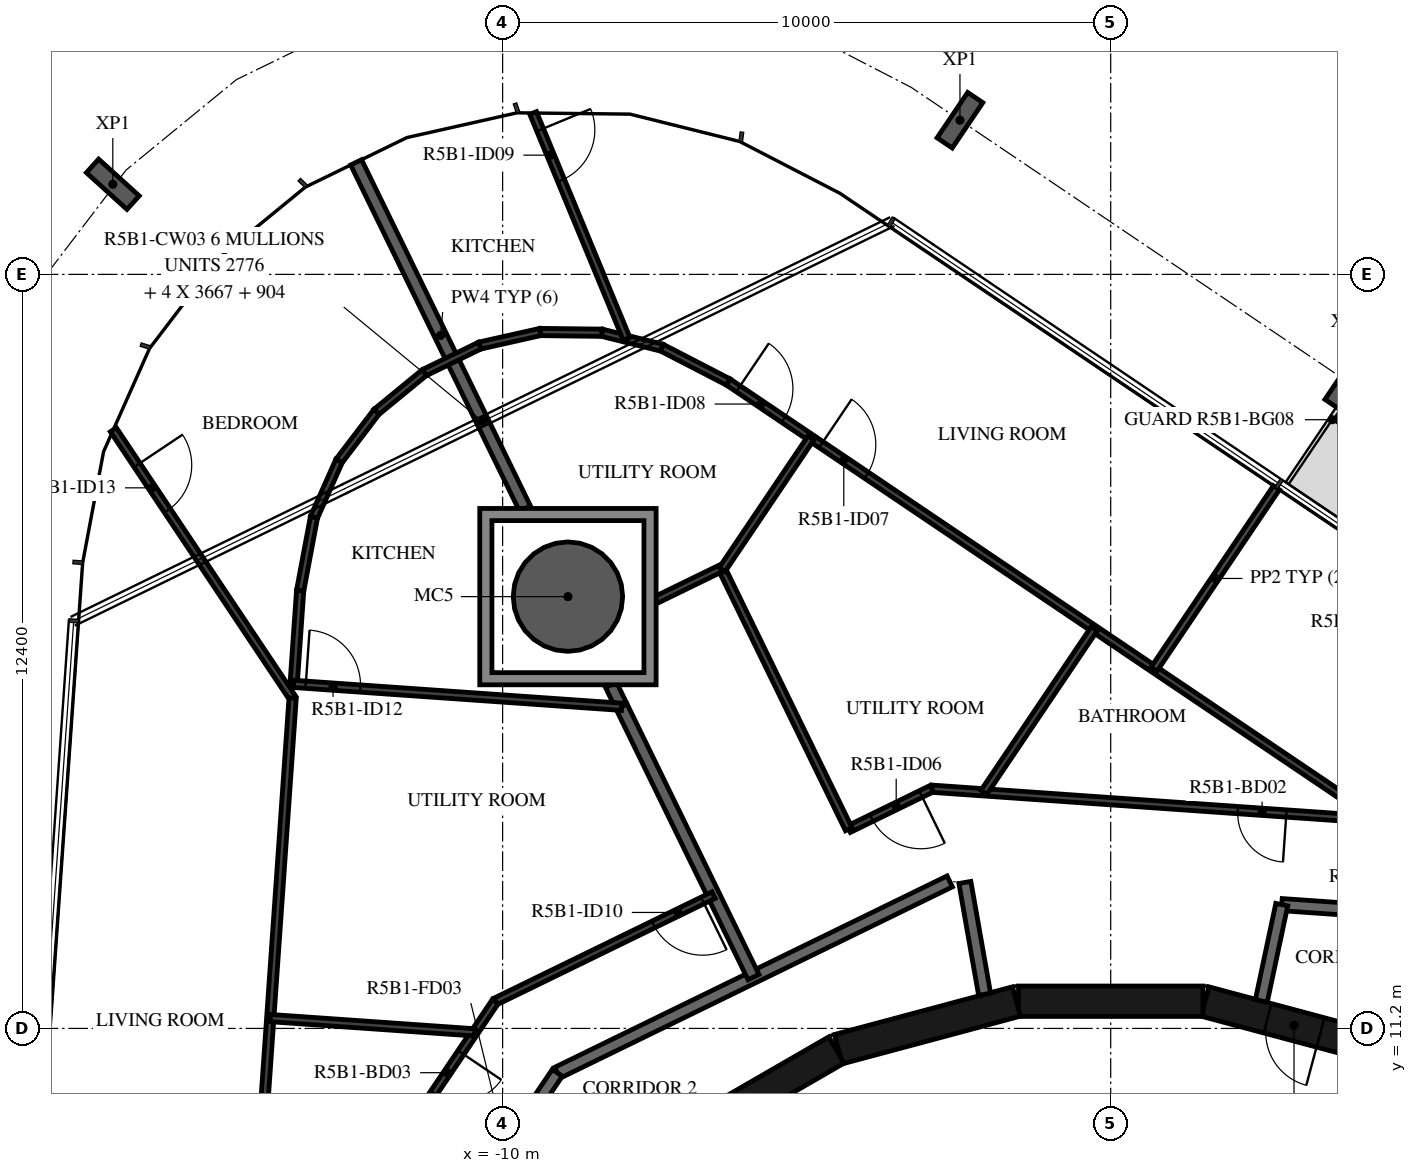
"""IFC4 building model, lengths in metres.
Left out: names, types, materials, properties, quantities, classifications, styles, units other than length and angle.
Written with IfcOpenShell. Run it as: python <this file> out.ifc"""

import sys

from ifc_helpers import new_model, si_unit, direction, frame, frame_2d, origin, origin_2d, place, context, subcontext, project, spatial, polyline, rectangle, hollow_circle, i_section, outline, extrude, element, fill, save


model = new_model("IFC4")
c1 = context("Model", 3, precision=1e-05, world=origin(), true_north=direction((0.0, 1.0)))
c2 = subcontext(c1, "Body", "Model", "MODEL_VIEW")
j1 = project(units=[si_unit("LENGTHUNIT", "METRE"), si_unit("PLANEANGLEUNIT", "RADIAN")], contexts=[c1])
p1 = place(None, origin())
s1 = spatial("IfcSite", under=j1, at=p1, CompositionType="ELEMENT")
p2 = place(p1, origin())
s2 = spatial("IfcBuilding", under=s1, at=p2, CompositionType="ELEMENT")
p3 = place(p2, frame((0.0, 0.0, 198.9)))
s3 = spatial("IfcBuildingStorey", under=s2, at=p3, CompositionType="ELEMENT", Elevation=198.9)
p4 = place(p3, frame((-8.926, 18.301, -0.38), z_axis=(0.0, 0.0, 1.0), x_axis=(1.0, 0.0, 0.0)))
e1 = element("IfcColumn", 1, at=p4, inside=s3, PredefinedType="COLUMN", context=c2, shape_type="SweptSolid", body=[
    extrude(hollow_circle(Radius=0.9, WallThickness=0.04, at=origin_2d()), origin(), (0.0, 0.0, 1.0), 3.5),
])
for number, where, z_axis, x_axis in (
    (2, (3.899, 21.833, -0.38), (0.0, 0.0, 1.0), (0.829, -0.559, 0.0)),
    (3, (-2.479, 26.135, -0.38), (0.0, 0.0, 1.0), (0.829, -0.559, 0.0)),
    (4, (-16.411, 25.082, -0.38), (0.0, 0.0, 1.0), (0.671, 0.741, 0.0)),
):
    element("IfcColumn", number, at=place(p3, frame(where, z_axis=z_axis, x_axis=x_axis)), inside=s3, PredefinedType="COLUMN", context=c2, shape_type="SweptSolid", body=[
        extrude(i_section(OverallWidth=0.3, OverallDepth=0.9, WebThickness=0.019, FlangeThickness=0.035, FilletRadius=0.03, at=origin_2d()), origin(), (0.0, 0.0, 1.0), 3.5),
    ])
p5 = place(p3, frame((4.479, 10.858, 0.0), z_axis=(0.0, 0.0, 1.0), x_axis=(-0.965948410781, 0.258734743916, 0.0)))
e5 = element("IfcWall", 5, at=p5, inside=s3, PredefinedType="SHEAR", context=c2, shape_type="SweptSolid", body=[
    extrude(rectangle(XDim=3.033, YDim=0.5, at=frame_2d((1.516, 0.0))), origin(), (0.0, 0.0, 1.0), 3.12),
])
p6 = place(p5, frame((1.066, 0.0, 0.0)))
e6 = element("IfcOpeningElement", 6, at=p6, cuts=e5, PredefinedType="OPENING", context=c2, shape_type="SweptSolid", body=[
    extrude(rectangle(XDim=0.9, YDim=2.1, at=frame_2d((0.45, 1.05))), frame((0.0, 0.26, 0.0), z_axis=(0.0, -1.0, 0.0), x_axis=(1.0, 0.0, 0.0)), (0.0, 0.0, 1.0), 0.52),
])
for number, where, z_axis, x_axis in (
    (7, (1.516, 11.647, 0.0), (0.0, 0.0, 1.0), (-1.0, 0.0, 0.0)),
    (8, (-1.55, 11.643, 0.0), (0.0, 0.0, 1.0), (-0.966, -0.259, 0.0)),
    (9, (-4.51, 10.845, 0.0), (0.0, 0.0, 1.0), (-0.866, -0.5, 0.0)),
):
    element("IfcWall", number, at=place(p3, frame(where, z_axis=z_axis, x_axis=x_axis)), inside=s3, PredefinedType="SHEAR", context=c2, shape_type="SweptSolid", body=[
        extrude(rectangle(XDim=3.033, YDim=0.5, at=frame_2d((1.516, 0.0))), origin(), (0.0, 0.0, 1.0), 3.12),
    ])
p7 = place(p3, frame((4.517, 13.117, 0.0), z_axis=(0.0, 0.0, 1.0), x_axis=(-0.997562153664, 0.069783591025, 0.0)))
e10 = element("IfcWall", 10, at=p7, inside=s3, PredefinedType="STANDARD", context=c2, shape_type="SweptSolid", body=[
    extrude(rectangle(XDim=1.707, YDim=0.2, at=frame_2d((0.854, 0.0))), origin(), (0.0, 0.0, 1.0), 3.12),
])
p8 = place(p3, frame((2.813, 13.236, 0.0), z_axis=(0.0, 0.0, 1.0), x_axis=(-0.207911086063, -0.978147729278, 0.0)))
e11 = element("IfcWall", 11, at=p8, inside=s3, PredefinedType="STANDARD", context=c2, shape_type="SweptSolid", body=[
    extrude(rectangle(XDim=1.618, YDim=0.2, at=frame_2d((0.809, 0.0))), origin(), (0.0, 0.0, 1.0), 3.12),
])
p9 = place(p3, frame((-2.074, 11.761, 0.0), z_axis=(0.0, 0.0, 1.0), x_axis=(-0.173740587112, 0.984791454263, 0.0)))
e12 = element("IfcWall", 12, at=p9, inside=s3, PredefinedType="STANDARD", context=c2, shape_type="SweptSolid", body=[
    extrude(rectangle(XDim=1.867, YDim=0.2, at=frame_2d((0.934, 0.0))), origin(), (0.0, 0.0, 1.0), 3.12),
])
p10 = place(p3, frame((-2.647, 13.618, 0.0), z_axis=(0.0, 0.0, 1.0), x_axis=(-0.898796543751, -0.438366026218, 0.0)))
e13 = element("IfcWall", 13, at=p10, inside=s3, PredefinedType="STANDARD", context=c2, shape_type="SweptSolid", body=[
    extrude(rectangle(XDim=7.181, YDim=0.2, at=frame_2d((3.591, 0.0))), origin(), (0.0, 0.0, 1.0), 3.12),
])
p11 = place(p3, frame((-9.101, 10.47, 0.0), z_axis=(0.0, 0.0, 1.0), x_axis=(-0.559195469534, -0.829035841718, 0.0)))
e14 = element("IfcWall", 14, at=p11, inside=s3, PredefinedType="STANDARD", context=c2, shape_type="SweptSolid", body=[
    extrude(rectangle(XDim=7.181, YDim=0.2, at=frame_2d((3.591, 0.0))), origin(), (0.0, 0.0, 1.0), 3.12),
])
p12 = place(p11, frame((1.0, 0.0, 0.0)))
e15 = element("IfcOpeningElement", 15, at=p12, cuts=e14, PredefinedType="OPENING", context=c2, shape_type="SweptSolid", body=[
    extrude(rectangle(XDim=1.0, YDim=2.1, at=frame_2d((0.5, 1.05))), frame((0.0, 0.11, 0.0), z_axis=(0.0, -1.0, 0.0), x_axis=(1.0, 0.0, 0.0)), (0.0, 0.0, 1.0), 0.22),
])
p13 = place(p3, frame((-8.042, 16.489, 0.0), z_axis=(0.0, 0.0, 1.0), x_axis=(0.438345825707, -0.898806395774, 0.0)))
e16 = element("IfcWall", 16, at=p13, inside=s3, PredefinedType="STANDARD", context=c2, shape_type="SweptSolid", body=[
    extrude(rectangle(XDim=4.946, YDim=0.2, at=frame_2d((2.473, 0.0))), origin(), (0.0, 0.0, 1.0), 3.12),
])
p14 = place(p3, frame((-8.219, 16.851, 0.0), z_axis=(0.0, 0.0, 1.0), x_axis=(0.438281645094, -0.898837693676, 0.0)))
e17 = element("IfcWall", 17, at=p14, inside=s3, PredefinedType="STANDARD", context=c2, shape_type="SweptSolid", body=[
    extrude(rectangle(XDim=0.373, YDim=0.2, at=frame_2d((0.186, 0.0))), origin(), (0.0, 0.0, 1.0), 3.12),
])
p15 = place(p3, frame((-12.409, 25.442, 0.0), z_axis=(0.0, 0.0, 1.0), x_axis=(0.43838641251, -0.898786600549, 0.0)))
e18 = element("IfcWall", 18, at=p15, inside=s3, PredefinedType="STANDARD", context=c2, shape_type="SweptSolid", body=[
    extrude(rectangle(XDim=6.333, YDim=0.2, at=frame_2d((3.166, 0.0))), origin(), (0.0, 0.0, 1.0), 3.12),
])
p16 = place(p3, frame((5.022, 14.585, 0.0), z_axis=(0.0, 0.0, 1.0), x_axis=(-0.997565118395, 0.069741197017, 0.0)))
e19 = element("IfcWall", 19, at=p16, inside=s3, PredefinedType="PARTITIONING", context=c2, shape_type="SweptSolid", body=[
    extrude(rectangle(XDim=7.985, YDim=0.12, at=frame_2d((3.993, 0.0))), origin(), (0.0, 0.0, 1.0), 3.12),
])
p17 = place(p16, frame((2.138, 0.0, 0.0)))
e20 = element("IfcOpeningElement", 20, at=p17, cuts=e19, PredefinedType="OPENING", context=c2, shape_type="SweptSolid", body=[
    extrude(rectangle(XDim=0.8, YDim=2.1, at=frame_2d((0.4, 1.05))), frame((0.0, 0.07, 0.0), z_axis=(0.0, -1.0, 0.0), x_axis=(1.0, 0.0, 0.0)), (0.0, 0.0, 1.0), 0.14),
])
p18 = place(p3, frame((-2.943, 15.142, 0.0), z_axis=(0.0, 0.0, 1.0), x_axis=(-0.898853439798, -0.438249351127, 0.0)))
e21 = element("IfcWall", 21, at=p18, inside=s3, PredefinedType="PARTITIONING", context=c2, shape_type="SweptSolid", body=[
    extrude(rectangle(XDim=1.518, YDim=0.12, at=frame_2d((0.759, 0.0))), origin(), (0.0, 0.0, 1.0), 3.12),
])
p19 = place(p18, frame((0.2, 0.0, 0.0)))
e22 = element("IfcOpeningElement", 22, at=p19, cuts=e21, PredefinedType="OPENING", context=c2, shape_type="SweptSolid", body=[
    extrude(rectangle(XDim=0.9, YDim=2.1, at=frame_2d((0.45, 1.05))), frame((0.0, 0.07, 0.0), z_axis=(0.0, -1.0, 0.0), x_axis=(1.0, 0.0, 0.0)), (0.0, 0.0, 1.0), 0.14),
])
p20 = place(p3, frame((-4.308, 14.477, 0.0), z_axis=(0.0, 0.0, 1.0), x_axis=(-0.43837096777, 0.898794133613, 0.0)))
e23 = element("IfcWall", 23, at=p20, inside=s3, PredefinedType="PARTITIONING", context=c2, shape_type="SweptSolid", body=[
    extrude(rectangle(XDim=4.75, YDim=0.12, at=frame_2d((2.375, 0.0))), origin(), (0.0, 0.0, 1.0), 3.12),
])
p21 = place(p3, frame((-6.402, 18.771, 0.0), z_axis=(0.0, 0.0, 1.0), x_axis=(-0.898797905192, -0.438363234797, 0.0)))
e24 = element("IfcWall", 24, at=p21, inside=s3, PredefinedType="PARTITIONING", context=c2, shape_type="SweptSolid", body=[
    extrude(rectangle(XDim=1.195, YDim=0.12, at=frame_2d((0.597, 0.0))), origin(), (0.0, 0.0, 1.0), 3.12),
])
p22 = place(p3, frame((-6.292, 21.831, 0.0), z_axis=(0.0, 0.0, 1.0), x_axis=(0.829040041754, -0.559189242715, 0.0)))
e25 = element("IfcWall", 25, at=p22, inside=s3, PredefinedType="PARTITIONING", context=c2, shape_type="SweptSolid", body=[
    extrude(rectangle(XDim=12.879, YDim=0.12, at=frame_2d((6.439, 0.0))), origin(), (0.0, 0.0, 1.0), 3.12),
])
p23 = place(p22, frame((1.844, 0.0, 0.0)))
e26 = element("IfcOpeningElement", 26, at=p23, cuts=e25, PredefinedType="OPENING", context=c2, shape_type="SweptSolid", body=[
    extrude(rectangle(XDim=0.9, YDim=2.1, at=frame_2d((0.45, 1.05))), frame((0.0, 0.07, 0.0), z_axis=(0.0, -1.0, 0.0), x_axis=(1.0, 0.0, 0.0)), (0.0, 0.0, 1.0), 0.14),
])
p24 = place(p22, frame((0.2, 0.0, 0.0)))
e27 = element("IfcOpeningElement", 27, at=p24, cuts=e25, PredefinedType="OPENING", context=c2, shape_type="SweptSolid", body=[
    extrude(rectangle(XDim=0.9, YDim=2.1, at=frame_2d((0.45, 1.05))), frame((0.0, 0.07, 0.0), z_axis=(0.0, -1.0, 0.0), x_axis=(1.0, 0.0, 0.0)), (0.0, 0.0, 1.0), 0.14),
])
p25 = place(p3, frame((2.725, 20.092, 0.0), z_axis=(0.0, 0.0, 1.0), x_axis=(-0.559230560117, -0.829012171582, 0.0)))
e28 = element("IfcWall", 28, at=p25, inside=s3, PredefinedType="PARTITIONING", context=c2, shape_type="SweptSolid", body=[
    extrude(rectangle(XDim=3.6, YDim=0.12, at=frame_2d((1.8, 0.0))), origin(), (0.0, 0.0, 1.0), 2.73),
])
p26 = place(p3, frame((-0.272, 17.771, 0.0), z_axis=(0.0, 0.0, 1.0), x_axis=(-0.559174158254, -0.829050216055, 0.0)))
e29 = element("IfcWall", 29, at=p26, inside=s3, PredefinedType="PARTITIONING", context=c2, shape_type="SweptSolid", body=[
    extrude(rectangle(XDim=3.243, YDim=0.12, at=frame_2d((1.622, 0.0))), origin(), (0.0, 0.0, 1.0), 3.12),
])
p27 = place(p3, frame((-8.367, 22.64, 0.0), z_axis=(0.0, 0.0, 1.0), x_axis=(0.970340073087, -0.241743960754, 0.0)))
e30 = element("IfcWall", 30, at=p27, inside=s3, PredefinedType="PARTITIONING", context=c2, shape_type="SweptSolid", body=[
    extrude(rectangle(XDim=1.016, YDim=0.12, at=frame_2d((0.508, 0.0))), origin(), (0.0, 0.0, 1.0), 3.12),
])
p28 = place(p3, frame((-7.382, 22.395, 0.0), z_axis=(0.0, 0.0, 1.0), x_axis=(0.888296031948, -0.459271335514, 0.0)))
e31 = element("IfcWall", 31, at=p28, inside=s3, PredefinedType="PARTITIONING", context=c2, shape_type="SweptSolid", body=[
    extrude(rectangle(XDim=1.227, YDim=0.12, at=frame_2d((0.613, 0.0))), origin(), (0.0, 0.0, 1.0), 3.12),
])
p29 = place(p3, frame((-9.498, 26.254, 0.0), z_axis=(0.0, 0.0, 1.0), x_axis=(0.38230709116, -0.924035328355, 0.0)))
e32 = element("IfcWall", 32, at=p29, inside=s3, PredefinedType="PARTITIONING", context=c2, shape_type="SweptSolid", body=[
    extrude(rectangle(XDim=4.02, YDim=0.12, at=frame_2d((2.01, 0.0))), origin(), (0.0, 0.0, 1.0), 3.12),
])
p30 = place(p29, frame((0.3, 0.0, 0.0)))
e33 = element("IfcOpeningElement", 33, at=p30, cuts=e32, PredefinedType="OPENING", context=c2, shape_type="SweptSolid", body=[
    extrude(rectangle(XDim=0.9, YDim=2.1, at=frame_2d((0.45, 1.05))), frame((0.0, 0.07, 0.0), z_axis=(0.0, -1.0, 0.0), x_axis=(1.0, 0.0, 0.0)), (0.0, 0.0, 1.0), 0.14),
])
p31 = place(p3, frame((-4.929, 20.912, 0.0), z_axis=(0.0, 0.0, 1.0), x_axis=(-0.559155109057, -0.829063063955, 0.0)))
e34 = element("IfcWall", 34, at=p31, inside=s3, PredefinedType="PARTITIONING", context=c2, shape_type="SweptSolid", body=[
    extrude(rectangle(XDim=2.613, YDim=0.12, at=frame_2d((1.307, 0.0))), origin(), (0.0, 0.0, 1.0), 3.12),
])
for number, where, z_axis, x_axis in (
    (35, (-8.367, 22.64, 0.0), (0.0, 0.0, 1.0), (-1.0, 0.012, 0.0)),
    (36, (-9.383, 22.652, 0.0), (0.0, 0.0, 1.0), (-0.976, -0.219, 0.0)),
):
    element("IfcWall", number, at=place(p3, frame(where, z_axis=z_axis, x_axis=x_axis)), inside=s3, PredefinedType="PARTITIONING", context=c2, shape_type="SweptSolid", body=[
        extrude(rectangle(XDim=1.016, YDim=0.12, at=frame_2d((0.508, 0.0))), origin(), (0.0, 0.0, 1.0), 3.12),
    ])
p32 = place(p3, frame((-10.375, 22.43, 0.0), z_axis=(0.0, 0.0, 1.0), x_axis=(-0.898710701911, -0.438541986895, 0.0)))
e37 = element("IfcWall", 37, at=p32, inside=s3, PredefinedType="PARTITIONING", context=c2, shape_type="SweptSolid", body=[
    extrude(rectangle(XDim=1.016, YDim=0.12, at=frame_2d((0.508, 0.0))), origin(), (0.0, 0.0, 1.0), 3.12),
])
p33 = place(p3, frame((-6.532, 13.392, 0.0), z_axis=(0.0, 0.0, 1.0), x_axis=(-0.898786663593, -0.438386283256, 0.0)))
e38 = element("IfcWall", 38, at=p33, inside=s3, PredefinedType="PARTITIONING", context=c2, shape_type="SweptSolid", body=[
    extrude(rectangle(XDim=3.992, YDim=0.12, at=frame_2d((1.996, 0.0))), origin(), (0.0, 0.0, 1.0), 3.12),
])
p34 = place(p33, frame((0.2, 0.0, 0.0)))
e39 = element("IfcOpeningElement", 39, at=p34, cuts=e38, PredefinedType="OPENING", context=c2, shape_type="SweptSolid", body=[
    extrude(rectangle(XDim=0.9, YDim=2.1, at=frame_2d((0.45, 1.05))), frame((0.0, 0.07, 0.0), z_axis=(0.0, -1.0, 0.0), x_axis=(1.0, 0.0, 0.0)), (0.0, 0.0, 1.0), 0.14),
])
p35 = place(p3, frame((-10.12, 11.642, 0.0), z_axis=(0.0, 0.0, 1.0), x_axis=(-0.559200431187, -0.829032494996, 0.0)))
e40 = element("IfcWall", 40, at=p35, inside=s3, PredefinedType="PARTITIONING", context=c2, shape_type="SweptSolid", body=[
    extrude(rectangle(XDim=6.973, YDim=0.12, at=frame_2d((3.487, 0.0))), origin(), (0.0, 0.0, 1.0), 3.12),
])
p36 = place(p35, frame((1.011, 0.0, 0.0)))
e41 = element("IfcOpeningElement", 41, at=p36, cuts=e40, PredefinedType="OPENING", context=c2, shape_type="SweptSolid", body=[
    extrude(rectangle(XDim=0.8, YDim=2.1, at=frame_2d((0.4, 1.05))), frame((0.0, 0.07, 0.0), z_axis=(0.0, -1.0, 0.0), x_axis=(1.0, 0.0, 0.0)), (0.0, 0.0, 1.0), 0.14),
])
for number, where, z_axis, x_axis in (
    (42, (-11.288, 21.984, 0.0), (0.0, 0.0, 1.0), (-0.774, -0.634, 0.0)),
    (43, (-12.073, 21.34, 0.0), (0.0, 0.0, 1.0), (-0.606, -0.795, 0.0)),
    (44, (-12.689, 20.532, 0.0), (0.0, 0.0, 1.0), (-0.407, -0.913, 0.0)),
):
    element("IfcWall", number, at=place(p3, frame(where, z_axis=z_axis, x_axis=x_axis)), inside=s3, PredefinedType="PARTITIONING", context=c2, shape_type="SweptSolid", body=[
        extrude(rectangle(XDim=1.016, YDim=0.12, at=frame_2d((0.508, 0.0))), origin(), (0.0, 0.0, 1.0), 3.12),
    ])
p37 = place(p3, frame((-13.103, 19.604, 0.0), z_axis=(0.0, 0.0, 1.0), x_axis=(-0.185045330455, -0.982729986149, 0.0)))
e45 = element("IfcWall", 45, at=p37, inside=s3, PredefinedType="PARTITIONING", context=c2, shape_type="SweptSolid", body=[
    extrude(rectangle(XDim=1.227, YDim=0.12, at=frame_2d((0.614, 0.0))), origin(), (0.0, 0.0, 1.0), 3.12),
])
p38 = place(p3, frame((-13.33, 18.399, 0.0), z_axis=(0.0, 0.0, 1.0), x_axis=(-0.069695040349, -0.9975683442, 0.0)))
e46 = element("IfcWall", 46, at=p38, inside=s3, PredefinedType="PARTITIONING", context=c2, shape_type="SweptSolid", body=[
    extrude(rectangle(XDim=1.576, YDim=0.12, at=frame_2d((0.788, 0.0))), origin(), (0.0, 0.0, 1.0), 3.12),
])
p39 = place(p3, frame((-13.437, 16.866, 0.0), z_axis=(0.0, 0.0, 1.0), x_axis=(0.997564592961, -0.06974871232, 0.0)))
e47 = element("IfcWall", 47, at=p39, inside=s3, PredefinedType="PARTITIONING", context=c2, shape_type="SweptSolid", body=[
    extrude(rectangle(XDim=5.408, YDim=0.12, at=frame_2d((2.704, 0.0))), origin(), (0.0, 0.0, 1.0), 3.12),
])
p40 = place(p39, frame((0.2, 0.0, 0.0)))
e48 = element("IfcOpeningElement", 48, at=p40, cuts=e47, PredefinedType="OPENING", context=c2, shape_type="SweptSolid", body=[
    extrude(rectangle(XDim=0.9, YDim=2.1, at=frame_2d((0.45, 1.05))), frame((0.0, 0.07, 0.0), z_axis=(0.0, -1.0, 0.0), x_axis=(1.0, 0.0, 0.0)), (0.0, 0.0, 1.0), 0.14),
])
p41 = place(p3, frame((-16.402, 21.046, 0.0), z_axis=(0.0, 0.0, 1.0), x_axis=(0.555442981062, -0.831554625259, 0.0)))
e49 = element("IfcWall", 49, at=p41, inside=s3, PredefinedType="PARTITIONING", context=c2, shape_type="SweptSolid", body=[
    extrude(rectangle(XDim=5.308, YDim=0.12, at=frame_2d((2.654, 0.0))), origin(), (0.0, 0.0, 1.0), 3.12),
])
p42 = place(p41, frame((0.7, 0.0, 0.0)))
e50 = element("IfcOpeningElement", 50, at=p42, cuts=e49, PredefinedType="OPENING", context=c2, shape_type="SweptSolid", body=[
    extrude(rectangle(XDim=0.9, YDim=2.1, at=frame_2d((0.45, 1.05))), frame((0.0, 0.07, 0.0), z_axis=(0.0, -1.0, 0.0), x_axis=(1.0, 0.0, 0.0)), (0.0, 0.0, 1.0), 0.14),
])
p43 = place(p3, frame((-13.453, 16.632, 0.0), z_axis=(0.0, 0.0, 1.0), x_axis=(-0.069757184581, -0.997564000553, 0.0)))
e51 = element("IfcWall", 51, at=p43, inside=s3, PredefinedType="PARTITIONING", context=c2, shape_type="SweptSolid", body=[
    extrude(rectangle(XDim=10.772, YDim=0.12, at=frame_2d((5.386, 0.0))), origin(), (0.0, 0.0, 1.0), 3.12),
])
p44 = place(p3, frame((-13.821, 11.37, 0.0), z_axis=(0.0, 0.0, 1.0), x_axis=(0.997559977048, -0.069814698975, 0.0)))
e52 = element("IfcWall", 52, at=p44, inside=s3, PredefinedType="PARTITIONING", context=c2, shape_type="SweptSolid", body=[
    extrude(rectangle(XDim=3.368, YDim=0.12, at=frame_2d((1.684, 0.0))), origin(), (0.0, 0.0, 1.0), 3.12),
])
p45 = place(p3, origin())
e53 = element("IfcWall", 53, at=p45, inside=s3, PredefinedType="STANDARD", context=c2, shape_type="SweptSolid", body=[
    extrude(outline(polyline([(-7.476, 19.751), (-7.476, 16.851), (-10.376, 16.851), (-10.376, 19.751), (-7.476, 19.751)]), holes=[polyline([(-10.176, 17.051), (-7.676, 17.051), (-7.676, 19.551), (-10.176, 19.551), (-10.176, 17.051)])]), origin(), (0.0, 0.0, 1.0), 3.12),
])
p46 = place(p6, origin())
e54 = element("IfcDoor", 54, at=p46, inside=s3, OperationType="SINGLE_SWING_LEFT", PredefinedType="DOOR", context=c2, shape_type="SweptSolid", body=[
    extrude(rectangle(XDim=0.9, YDim=2.1, at=frame_2d((0.45, 1.05))), frame((0.0, 0.025, 0.0), z_axis=(0.0, -1.0, 0.0), x_axis=(1.0, 0.0, 0.0)), (0.0, 0.0, 1.0), 0.05),
])
fill(e6, e54)
p47 = place(p17, origin())
e55 = element("IfcDoor", 55, at=p47, inside=s3, OperationType="SINGLE_SWING_RIGHT", PredefinedType="DOOR", context=c2, shape_type="SweptSolid", body=[
    extrude(rectangle(XDim=0.8, YDim=2.1, at=frame_2d((0.4, 1.05))), frame((0.0, 0.025, 0.0), z_axis=(0.0, -1.0, 0.0), x_axis=(1.0, 0.0, 0.0)), (0.0, 0.0, 1.0), 0.05),
])
fill(e20, e55)
p48 = place(p19, origin())
e56 = element("IfcDoor", 56, at=p48, inside=s3, OperationType="SINGLE_SWING_RIGHT", PredefinedType="DOOR", context=c2, shape_type="SweptSolid", body=[
    extrude(rectangle(XDim=0.9, YDim=2.1, at=frame_2d((0.45, 1.05))), frame((0.0, 0.025, 0.0), z_axis=(0.0, -1.0, 0.0), x_axis=(1.0, 0.0, 0.0)), (0.0, 0.0, 1.0), 0.05),
])
fill(e22, e56)
p49 = place(p23, origin())
e57 = element("IfcDoor", 57, at=p49, inside=s3, OperationType="SINGLE_SWING_RIGHT", PredefinedType="DOOR", context=c2, shape_type="SweptSolid", body=[
    extrude(rectangle(XDim=0.9, YDim=2.1, at=frame_2d((0.45, 1.05))), frame((0.0, 0.025, 0.0), z_axis=(0.0, -1.0, 0.0), x_axis=(1.0, 0.0, 0.0)), (0.0, 0.0, 1.0), 0.05),
])
fill(e26, e57)
p50 = place(p24, origin())
e58 = element("IfcDoor", 58, at=p50, inside=s3, OperationType="SINGLE_SWING_LEFT", PredefinedType="DOOR", context=c2, shape_type="SweptSolid", body=[
    extrude(rectangle(XDim=0.9, YDim=2.1, at=frame_2d((0.45, 1.05))), frame((0.0, 0.025, 0.0), z_axis=(0.0, -1.0, 0.0), x_axis=(1.0, 0.0, 0.0)), (0.0, 0.0, 1.0), 0.05),
])
fill(e27, e58)
p51 = place(p30, origin())
e59 = element("IfcDoor", 59, at=p51, inside=s3, OperationType="SINGLE_SWING_RIGHT", PredefinedType="DOOR", context=c2, shape_type="SweptSolid", body=[
    extrude(rectangle(XDim=0.9, YDim=2.1, at=frame_2d((0.45, 1.05))), frame((0.0, 0.025, 0.0), z_axis=(0.0, -1.0, 0.0), x_axis=(1.0, 0.0, 0.0)), (0.0, 0.0, 1.0), 0.05),
])
fill(e33, e59)
p52 = place(p34, origin())
e60 = element("IfcDoor", 60, at=p52, inside=s3, OperationType="SINGLE_SWING_LEFT", PredefinedType="DOOR", context=c2, shape_type="SweptSolid", body=[
    extrude(rectangle(XDim=0.9, YDim=2.1, at=frame_2d((0.45, 1.05))), frame((0.0, 0.025, 0.0), z_axis=(0.0, -1.0, 0.0), x_axis=(1.0, 0.0, 0.0)), (0.0, 0.0, 1.0), 0.05),
])
fill(e39, e60)
p53 = place(p36, origin())
e61 = element("IfcDoor", 61, at=p53, inside=s3, OperationType="SINGLE_SWING_LEFT", PredefinedType="DOOR", context=c2, shape_type="SweptSolid", body=[
    extrude(rectangle(XDim=0.8, YDim=2.1, at=frame_2d((0.4, 1.05))), frame((0.0, 0.025, 0.0), z_axis=(0.0, -1.0, 0.0), x_axis=(1.0, 0.0, 0.0)), (0.0, 0.0, 1.0), 0.05),
])
fill(e41, e61)
p54 = place(p40, origin())
e62 = element("IfcDoor", 62, at=p54, inside=s3, OperationType="SINGLE_SWING_LEFT", PredefinedType="DOOR", context=c2, shape_type="SweptSolid", body=[
    extrude(rectangle(XDim=0.9, YDim=2.1, at=frame_2d((0.45, 1.05))), frame((0.0, 0.025, 0.0), z_axis=(0.0, -1.0, 0.0), x_axis=(1.0, 0.0, 0.0)), (0.0, 0.0, 1.0), 0.05),
])
fill(e48, e62)
p55 = place(p42, origin())
e63 = element("IfcDoor", 63, at=p55, inside=s3, OperationType="SINGLE_SWING_LEFT", PredefinedType="DOOR", context=c2, shape_type="SweptSolid", body=[
    extrude(rectangle(XDim=0.9, YDim=2.1, at=frame_2d((0.45, 1.05))), frame((0.0, 0.025, 0.0), z_axis=(0.0, -1.0, 0.0), x_axis=(1.0, 0.0, 0.0)), (0.0, 0.0, 1.0), 0.05),
])
fill(e50, e63)
save(model, sys.argv[1])
